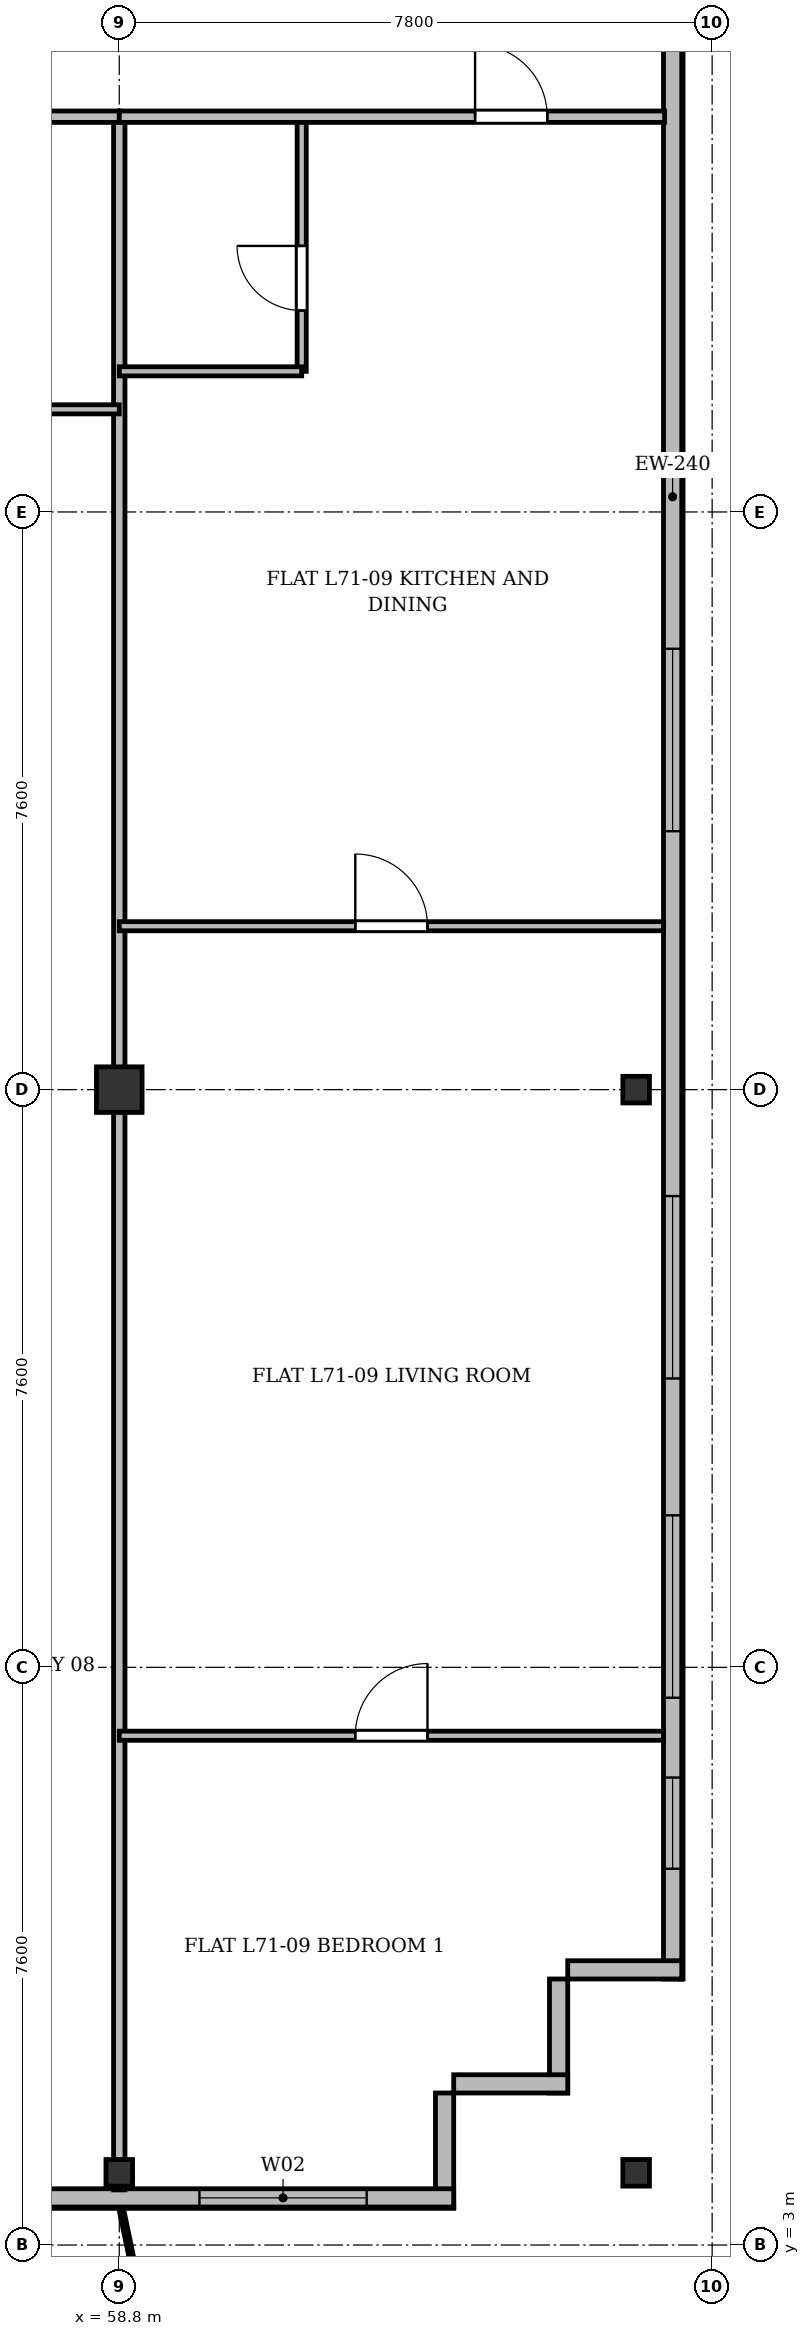
"""IFC4 building model, lengths in metres.
Left out: names, types, materials, properties, quantities, classifications, styles, units other than length and angle.
Written with IfcOpenShell. Run it as: python <this file> out.ifc"""

import sys

from ifc_helpers import new_model, si_unit, direction, frame, frame_2d, origin, origin_2d, place, context, subcontext, project, spatial, rectangle, i_section, extrude, source, transform, mapped, element, fill, save


model = new_model("IFC4")
c1 = context("Model", 3, precision=1e-05, world=origin(), true_north=direction((0.0, 1.0)))
c2 = subcontext(c1, "Body", "Model", "MODEL_VIEW")
j1 = project(units=[si_unit("LENGTHUNIT", "METRE"), si_unit("PLANEANGLEUNIT", "RADIAN")], contexts=[c1])
p1 = place(None, origin())
s1 = spatial("IfcSite", under=j1, at=p1, CompositionType="ELEMENT")
p2 = place(p1, origin())
s2 = spatial("IfcBuilding", under=s1, at=p2, CompositionType="ELEMENT")
p3 = place(p2, frame((0.0, 0.0, 273.9)))
s3 = spatial("IfcBuildingStorey", under=s2, at=p3, CompositionType="ELEMENT", Elevation=273.9)
m1 = source(origin(), c2, "Body", "SweptSolid", [
    extrude(i_section(OverallWidth=0.35, OverallDepth=0.35, WebThickness=0.018, FlangeThickness=0.028, at=origin_2d()), origin(), (0.0, 0.0, 1.0), 3.6),
])
p4 = place(p3, frame((58.8, 3.95, 0.0), z_axis=(0.0, 0.0, 1.0), x_axis=(1.0, 0.0, 0.0)))
e1 = element("IfcColumn", 1, at=p4, inside=s3, PredefinedType="COLUMN", context=c2, shape_type="MappedRepresentation", body=[
    mapped(m1, transform((0.0, 0.0, 0.0), x_axis=(1.0, 0.0, 0.0), y_axis=(0.0, 1.0, 0.0), z_axis=(0.0, 0.0, 1.0), scale=1.0)),
])
m2 = source(origin(), c2, "Body", "SweptSolid", [
    extrude(rectangle(XDim=0.6, YDim=0.6, at=origin_2d()), origin(), (0.0, 0.0, 1.0), 3.6),
])
p5 = place(p3, frame((58.8, 18.2, 0.0), z_axis=(0.0, 0.0, 1.0), x_axis=(1.0, 0.0, 0.0)))
e2 = element("IfcColumn", 2, at=p5, inside=s3, PredefinedType="COLUMN", context=c2, shape_type="MappedRepresentation", body=[
    mapped(m2, transform((0.0, 0.0, 0.0), x_axis=(1.0, 0.0, 0.0), y_axis=(0.0, 1.0, 0.0), z_axis=(0.0, 0.0, 1.0), scale=1.0)),
])
for number, where, z_axis, x_axis in (
    (3, (65.6, 3.95, 0.0), (0.0, 0.0, 1.0), (1.0, 0.0, 0.0)),
    (4, (65.6, 18.2, 0.0), (0.0, 0.0, 1.0), (1.0, 0.0, 0.0)),
):
    element("IfcColumn", number, at=place(p3, frame(where, z_axis=z_axis, x_axis=x_axis)), inside=s3, PredefinedType="COLUMN", context=c2, shape_type="MappedRepresentation", body=[
        mapped(m1, transform((0.0, 0.0, 0.0), x_axis=(1.0, 0.0, 0.0), y_axis=(0.0, 1.0, 0.0), z_axis=(0.0, 0.0, 1.0), scale=1.0)),
    ])
p6 = place(p3, frame((66.08, 45.5, 0.0), z_axis=(0.0, 0.0, 1.0), x_axis=(0.0, -1.0, 0.0)))
e5 = element("IfcWall", 5, at=p6, inside=s3, PredefinedType="SOLIDWALL", context=c2, shape_type="SweptSolid", body=[
    extrude(rectangle(XDim=39.0, YDim=0.24, at=frame_2d((19.5, 0.0))), origin(), (0.0, 0.0, 1.0), 3.37),
])
p7 = place(p6, frame((36.35, 0.0, 0.92)))
e6 = element("IfcOpeningElement", 6, at=p7, cuts=e5, PredefinedType="OPENING", context=c2, shape_type="SweptSolid", body=[
    extrude(rectangle(XDim=1.2, YDim=1.65, at=frame_2d((0.6, 0.825))), frame((0.0, 0.13, 0.0), z_axis=(0.0, -1.0, 0.0), x_axis=(1.0, 0.0, 0.0)), (0.0, 0.0, 1.0), 0.26),
])
p8 = place(p6, frame((32.9, 0.0, 0.92)))
e7 = element("IfcOpeningElement", 7, at=p8, cuts=e5, PredefinedType="OPENING", context=c2, shape_type="SweptSolid", body=[
    extrude(rectangle(XDim=2.4, YDim=2.1, at=frame_2d((1.2, 1.05))), frame((0.0, 0.13, 0.0), z_axis=(0.0, -1.0, 0.0), x_axis=(1.0, 0.0, 0.0)), (0.0, 0.0, 1.0), 0.26),
])
p9 = place(p6, frame((28.7, 0.0, 0.92)))
e8 = element("IfcOpeningElement", 8, at=p9, cuts=e5, PredefinedType="OPENING", context=c2, shape_type="SweptSolid", body=[
    extrude(rectangle(XDim=2.4, YDim=2.1, at=frame_2d((1.2, 1.05))), frame((0.0, 0.13, 0.0), z_axis=(0.0, -1.0, 0.0), x_axis=(1.0, 0.0, 0.0)), (0.0, 0.0, 1.0), 0.26),
])
p10 = place(p6, frame((21.5, 0.0, 0.92)))
e9 = element("IfcOpeningElement", 9, at=p10, cuts=e5, PredefinedType="OPENING", context=c2, shape_type="SweptSolid", body=[
    extrude(rectangle(XDim=2.4, YDim=2.1, at=frame_2d((1.2, 1.05))), frame((0.0, 0.13, 0.0), z_axis=(0.0, -1.0, 0.0), x_axis=(1.0, 0.0, 0.0)), (0.0, 0.0, 1.0), 0.26),
])
p11 = place(p6, frame((7.5, 0.0, 0.92)))
e10 = element("IfcOpeningElement", 10, at=p11, cuts=e5, PredefinedType="OPENING", context=c2, shape_type="SweptSolid", body=[
    extrude(rectangle(XDim=2.4, YDim=2.1, at=frame_2d((1.2, 1.05))), frame((0.0, 0.13, 0.0), z_axis=(0.0, -1.0, 0.0), x_axis=(1.0, 0.0, 0.0)), (0.0, 0.0, 1.0), 0.26),
])
p12 = place(p6, frame((4.5, 0.0, 0.92)))
e11 = element("IfcOpeningElement", 11, at=p12, cuts=e5, PredefinedType="OPENING", context=c2, shape_type="SweptSolid", body=[
    extrude(rectangle(XDim=1.2, YDim=1.65, at=frame_2d((0.6, 0.825))), frame((0.0, 0.13, 0.0), z_axis=(0.0, -1.0, 0.0), x_axis=(1.0, 0.0, 0.0)), (0.0, 0.0, 1.0), 0.26),
])
p13 = place(p6, frame((1.15, 0.0, 0.92)))
e12 = element("IfcOpeningElement", 12, at=p13, cuts=e5, PredefinedType="OPENING", context=c2, shape_type="SweptSolid", body=[
    extrude(rectangle(XDim=1.2, YDim=1.65, at=frame_2d((0.6, 0.825))), frame((0.0, 0.13, 0.0), z_axis=(0.0, -1.0, 0.0), x_axis=(1.0, 0.0, 0.0)), (0.0, 0.0, 1.0), 0.26),
])
p14 = place(p3, frame((66.2, 6.62, 0.0), z_axis=(0.0, 0.0, 1.0), x_axis=(-1.0, 0.0, 0.0)))
e13 = element("IfcWall", 13, at=p14, inside=s3, PredefinedType="SOLIDWALL", context=c2, shape_type="SweptSolid", body=[
    extrude(rectangle(XDim=1.5, YDim=0.24, at=frame_2d((0.75, 0.0))), origin(), (0.0, 0.0, 1.0), 2.87),
])
for number, where, z_axis, x_axis in (
    (14, (64.58, 6.5, 0.0), (0.0, 0.0, 1.0), (0.0, -1.0, 0.0)),
    (15, (64.7, 5.12, 0.0), (0.0, 0.0, 1.0), (-1.0, 0.0, 0.0)),
):
    element("IfcWall", number, at=place(p3, frame(where, z_axis=z_axis, x_axis=x_axis)), inside=s3, PredefinedType="SOLIDWALL", context=c2, shape_type="SweptSolid", body=[
        extrude(rectangle(XDim=1.5, YDim=0.24, at=frame_2d((0.75, 0.0))), origin(), (0.0, 0.0, 1.0), 3.37),
    ])
p15 = place(p3, frame((63.08, 5.0, 0.0), z_axis=(0.0, 0.0, 1.0), x_axis=(0.0, -1.0, 0.0)))
e16 = element("IfcWall", 16, at=p15, inside=s3, PredefinedType="SOLIDWALL", context=c2, shape_type="SweptSolid", body=[
    extrude(rectangle(XDim=1.5, YDim=0.24, at=frame_2d((0.75, 0.0))), origin(), (0.0, 0.0, 1.0), 2.92),
])
p16 = place(p3, frame((63.2, 3.62, 0.0), z_axis=(0.0, 0.0, 1.0), x_axis=(-1.0, 0.0, 0.0)))
e17 = element("IfcWall", 17, at=p16, inside=s3, PredefinedType="SOLIDWALL", context=c2, shape_type="SweptSolid", body=[
    extrude(rectangle(XDim=52.0, YDim=0.24, at=frame_2d((26.0, 0.0))), origin(), (0.0, 0.0, 1.0), 3.37),
])
p17 = place(p16, frame((1.145, 0.0, 0.9)))
e18 = element("IfcOpeningElement", 18, at=p17, cuts=e17, PredefinedType="OPENING", context=c2, shape_type="SweptSolid", body=[
    extrude(rectangle(XDim=2.2, YDim=1.8, at=frame_2d((1.1, 0.9))), frame((0.0, 0.13, 0.0), z_axis=(0.0, -1.0, 0.0), x_axis=(1.0, 0.0, 0.0)), (0.0, 0.0, 1.0), 0.26),
])
p18 = place(p16, frame((5.45, 0.0, 0.9)))
e19 = element("IfcOpeningElement", 19, at=p18, cuts=e17, PredefinedType="OPENING", context=c2, shape_type="SweptSolid", body=[
    extrude(rectangle(XDim=1.5, YDim=1.75, at=frame_2d((0.75, 0.875))), frame((0.0, 0.13, 0.0), z_axis=(0.0, -1.0, 0.0), x_axis=(1.0, 0.0, 0.0)), (0.0, 0.0, 1.0), 0.26),
])
p19 = place(p16, frame((9.1, 0.0, 0.9)))
e20 = element("IfcOpeningElement", 20, at=p19, cuts=e17, PredefinedType="OPENING", context=c2, shape_type="SweptSolid", body=[
    extrude(rectangle(XDim=2.0, YDim=1.95, at=frame_2d((1.0, 0.975))), frame((0.0, 0.13, 0.0), z_axis=(0.0, -1.0, 0.0), x_axis=(1.0, 0.0, 0.0)), (0.0, 0.0, 1.0), 0.26),
])
p20 = place(p16, frame((14.017, 0.0, 0.0)))
e21 = element("IfcOpeningElement", 21, at=p20, cuts=e17, PredefinedType="OPENING", context=c2, shape_type="SweptSolid", body=[
    extrude(rectangle(XDim=1.2, YDim=2.2, at=frame_2d((0.6, 1.1))), frame((0.0, 0.13, 0.0), z_axis=(0.0, -1.0, 0.0), x_axis=(1.0, 0.0, 0.0)), (0.0, 0.0, 1.0), 0.26),
])
p21 = place(p16, frame((25.1, 0.0, 0.9)))
e22 = element("IfcOpeningElement", 22, at=p21, cuts=e17, PredefinedType="OPENING", context=c2, shape_type="SweptSolid", body=[
    extrude(rectangle(XDim=1.8, YDim=1.8, at=frame_2d((0.9, 0.9))), frame((0.0, 0.13, 0.0), z_axis=(0.0, -1.0, 0.0), x_axis=(1.0, 0.0, 0.0)), (0.0, 0.0, 1.0), 0.26),
])
p22 = place(p16, frame((33.05, 0.0, 0.9)))
e23 = element("IfcOpeningElement", 23, at=p22, cuts=e17, PredefinedType="OPENING", context=c2, shape_type="SweptSolid", body=[
    extrude(rectangle(XDim=1.5, YDim=1.75, at=frame_2d((0.75, 0.875))), frame((0.0, 0.13, 0.0), z_axis=(0.0, -1.0, 0.0), x_axis=(1.0, 0.0, 0.0)), (0.0, 0.0, 1.0), 0.26),
])
p23 = place(p16, frame((35.45, 0.0, 0.9)))
e24 = element("IfcOpeningElement", 24, at=p23, cuts=e17, PredefinedType="OPENING", context=c2, shape_type="SweptSolid", body=[
    extrude(rectangle(XDim=1.5, YDim=1.75, at=frame_2d((0.75, 0.875))), frame((0.0, 0.13, 0.0), z_axis=(0.0, -1.0, 0.0), x_axis=(1.0, 0.0, 0.0)), (0.0, 0.0, 1.0), 0.26),
])
p24 = place(p16, frame((37.85, 0.0, 0.9)))
e25 = element("IfcOpeningElement", 25, at=p24, cuts=e17, PredefinedType="OPENING", context=c2, shape_type="SweptSolid", body=[
    extrude(rectangle(XDim=1.5, YDim=1.75, at=frame_2d((0.75, 0.875))), frame((0.0, 0.13, 0.0), z_axis=(0.0, -1.0, 0.0), x_axis=(1.0, 0.0, 0.0)), (0.0, 0.0, 1.0), 0.26),
])
p25 = place(p16, frame((41.452, 0.0, 0.0)))
e26 = element("IfcOpeningElement", 26, at=p25, cuts=e17, PredefinedType="OPENING", context=c2, shape_type="SweptSolid", body=[
    extrude(rectangle(XDim=1.2, YDim=2.2, at=frame_2d((0.6, 1.1))), frame((0.0, 0.13, 0.0), z_axis=(0.0, -1.0, 0.0), x_axis=(1.0, 0.0, 0.0)), (0.0, 0.0, 1.0), 0.26),
])
p26 = place(p16, frame((44.5, 0.0, 0.9)))
e27 = element("IfcOpeningElement", 27, at=p26, cuts=e17, PredefinedType="OPENING", context=c2, shape_type="SweptSolid", body=[
    extrude(rectangle(XDim=1.8, YDim=1.8, at=frame_2d((0.9, 0.9))), frame((0.0, 0.13, 0.0), z_axis=(0.0, -1.0, 0.0), x_axis=(1.0, 0.0, 0.0)), (0.0, 0.0, 1.0), 0.26),
])
p27 = place(p16, frame((48.655, 0.0, 0.9)))
e28 = element("IfcOpeningElement", 28, at=p27, cuts=e17, PredefinedType="OPENING", context=c2, shape_type="SweptSolid", body=[
    extrude(rectangle(XDim=2.2, YDim=1.8, at=frame_2d((1.1, 0.9))), frame((0.0, 0.13, 0.0), z_axis=(0.0, -1.0, 0.0), x_axis=(1.0, 0.0, 0.0)), (0.0, 0.0, 1.0), 0.26),
])
p28 = place(p3, frame((58.8, 3.725, 0.0), z_axis=(0.0, 0.0, 1.0), x_axis=(0.0, 1.0, 0.0)))
e29 = element("IfcWall", 29, at=p28, inside=s3, PredefinedType="PARTITIONING", context=c2, shape_type="SweptSolid", body=[
    extrude(rectangle(XDim=27.275, YDim=0.15, at=frame_2d((13.637, 0.0))), origin(), (0.0, 0.0, 1.0), 2.87),
])
p29 = place(p3, frame((55.2, 31.0, 0.0), z_axis=(0.0, 0.0, 1.0), x_axis=(1.0, 0.0, 0.0)))
e30 = element("IfcWall", 30, at=p29, inside=s3, PredefinedType="PARTITIONING", context=c2, shape_type="SweptSolid", body=[
    extrude(rectangle(XDim=3.6, YDim=0.15, at=frame_2d((1.8, 0.0))), origin(), (0.0, 0.0, 1.0), 2.87),
])
p30 = place(p29, frame((1.325, 0.0, 0.0)))
e31 = element("IfcOpeningElement", 31, at=p30, cuts=e30, PredefinedType="OPENING", context=c2, shape_type="SweptSolid", body=[
    extrude(rectangle(XDim=0.95, YDim=2.15, at=frame_2d((0.475, 1.075))), frame((0.0, 0.085, 0.0), z_axis=(0.0, -1.0, 0.0), x_axis=(1.0, 0.0, 0.0)), (0.0, 0.0, 1.0), 0.17),
])
p31 = place(p3, frame((55.2, 27.15, 0.0), z_axis=(0.0, 0.0, 1.0), x_axis=(1.0, 0.0, 0.0)))
e32 = element("IfcWall", 32, at=p31, inside=s3, PredefinedType="PARTITIONING", context=c2, shape_type="SweptSolid", body=[
    extrude(rectangle(XDim=3.6, YDim=0.12, at=frame_2d((1.8, 0.0))), origin(), (0.0, 0.0, 1.0), 2.87),
])
p32 = place(p31, frame((1.325, 0.0, 0.0)))
e33 = element("IfcOpeningElement", 33, at=p32, cuts=e32, PredefinedType="OPENING", context=c2, shape_type="SweptSolid", body=[
    extrude(rectangle(XDim=0.95, YDim=2.15, at=frame_2d((0.475, 1.075))), frame((0.0, 0.07, 0.0), z_axis=(0.0, -1.0, 0.0), x_axis=(1.0, 0.0, 0.0)), (0.0, 0.0, 1.0), 0.14),
])
p33 = place(p3, frame((58.8, 20.35, 0.0), z_axis=(0.0, 0.0, 1.0), x_axis=(1.0, 0.0, 0.0)))
e34 = element("IfcWall", 34, at=p33, inside=s3, PredefinedType="PARTITIONING", context=c2, shape_type="SweptSolid", body=[
    extrude(rectangle(XDim=7.16, YDim=0.12, at=frame_2d((3.58, 0.0))), origin(), (0.0, 0.0, 1.0), 2.87),
])
p34 = place(p33, frame((3.105, 0.0, 0.0)))
e35 = element("IfcOpeningElement", 35, at=p34, cuts=e34, PredefinedType="OPENING", context=c2, shape_type="SweptSolid", body=[
    extrude(rectangle(XDim=0.95, YDim=2.15, at=frame_2d((0.475, 1.075))), frame((0.0, 0.07, 0.0), z_axis=(0.0, -1.0, 0.0), x_axis=(1.0, 0.0, 0.0)), (0.0, 0.0, 1.0), 0.14),
])
p35 = place(p3, frame((61.2, 27.65, 0.0), z_axis=(0.0, 0.0, 1.0), x_axis=(0.0, 1.0, 0.0)))
e36 = element("IfcWall", 36, at=p35, inside=s3, PredefinedType="PARTITIONING", context=c2, shape_type="SweptSolid", body=[
    extrude(rectangle(XDim=3.35, YDim=0.12, at=frame_2d((1.675, 0.0))), origin(), (0.0, 0.0, 1.0), 3.37),
])
p36 = place(p35, frame((0.8, 0.0, 0.0)))
e37 = element("IfcOpeningElement", 37, at=p36, cuts=e36, PredefinedType="OPENING", context=c2, shape_type="SweptSolid", body=[
    extrude(rectangle(XDim=0.85, YDim=2.1, at=frame_2d((0.425, 1.05))), frame((0.0, 0.07, 0.0), z_axis=(0.0, -1.0, 0.0), x_axis=(1.0, 0.0, 0.0)), (0.0, 0.0, 1.0), 0.14),
])
p37 = place(p3, frame((58.8, 27.65, 0.0), z_axis=(0.0, 0.0, 1.0), x_axis=(1.0, 0.0, 0.0)))
e38 = element("IfcWall", 38, at=p37, inside=s3, PredefinedType="PARTITIONING", context=c2, shape_type="SweptSolid", body=[
    extrude(rectangle(XDim=2.4, YDim=0.12, at=frame_2d((1.2, 0.0))), origin(), (0.0, 0.0, 1.0), 2.87),
])
p38 = place(p3, frame((58.8, 31.0, 0.0), z_axis=(0.0, 0.0, 1.0), x_axis=(1.0, 0.0, 0.0)))
e39 = element("IfcWall", 39, at=p38, inside=s3, PredefinedType="PARTITIONING", context=c2, shape_type="SweptSolid", body=[
    extrude(rectangle(XDim=7.175, YDim=0.15, at=frame_2d((3.587, 0.0))), origin(), (0.0, 0.0, 1.0), 2.87),
])
p39 = place(p38, frame((4.681, 0.0, 0.0)))
e40 = element("IfcOpeningElement", 40, at=p39, cuts=e39, PredefinedType="OPENING", context=c2, shape_type="SweptSolid", body=[
    extrude(rectangle(XDim=0.95, YDim=2.15, at=frame_2d((0.475, 1.075))), frame((0.0, 0.085, 0.0), z_axis=(0.0, -1.0, 0.0), x_axis=(1.0, 0.0, 0.0)), (0.0, 0.0, 1.0), 0.17),
])
p40 = place(p3, frame((58.8, 9.7, 0.0), z_axis=(0.0, 0.0, 1.0), x_axis=(1.0, 0.0, 0.0)))
e41 = element("IfcWall", 41, at=p40, inside=s3, PredefinedType="PARTITIONING", context=c2, shape_type="SweptSolid", body=[
    extrude(rectangle(XDim=7.16, YDim=0.12, at=frame_2d((3.58, 0.0))), origin(), (0.0, 0.0, 1.0), 2.87),
])
p41 = place(p40, frame((3.105, 0.0, 0.0)))
e42 = element("IfcOpeningElement", 42, at=p41, cuts=e41, PredefinedType="OPENING", context=c2, shape_type="SweptSolid", body=[
    extrude(rectangle(XDim=0.95, YDim=2.15, at=frame_2d((0.475, 1.075))), frame((0.0, 0.07, 0.0), z_axis=(0.0, -1.0, 0.0), x_axis=(1.0, 0.0, 0.0)), (0.0, 0.0, 1.0), 0.14),
])
m3 = source(origin(), c2, "Body", "SweptSolid", [
    extrude(rectangle(XDim=1.2, YDim=1.65, at=frame_2d((0.6, 0.825))), frame((0.0, 0.03, 0.0), z_axis=(0.0, -1.0, 0.0), x_axis=(1.0, 0.0, 0.0)), (0.0, 0.0, 1.0), 0.06),
])
p42 = place(p7, origin())
e43 = element("IfcWindow", 43, at=p42, inside=s3, PartitioningType="SINGLE_PANEL", PredefinedType="WINDOW", context=c2, shape_type="MappedRepresentation", body=[
    mapped(m3, transform((0.0, 0.0, 0.0), x_axis=(1.0, 0.0, 0.0), y_axis=(0.0, 1.0, 0.0), z_axis=(0.0, 0.0, 1.0), scale=1.0)),
])
fill(e6, e43)
m4 = source(origin(), c2, "Body", "SweptSolid", [
    extrude(rectangle(XDim=2.4, YDim=2.1, at=frame_2d((1.2, 1.05))), frame((0.0, 0.03, 0.0), z_axis=(0.0, -1.0, 0.0), x_axis=(1.0, 0.0, 0.0)), (0.0, 0.0, 1.0), 0.06),
])
p43 = place(p8, origin())
e44 = element("IfcWindow", 44, at=p43, inside=s3, PartitioningType="SINGLE_PANEL", PredefinedType="WINDOW", context=c2, shape_type="MappedRepresentation", body=[
    mapped(m4, transform((0.0, 0.0, 0.0), x_axis=(1.0, 0.0, 0.0), y_axis=(0.0, 1.0, 0.0), z_axis=(0.0, 0.0, 1.0), scale=1.0)),
])
fill(e7, e44)
p44 = place(p9, origin())
e45 = element("IfcWindow", 45, at=p44, inside=s3, PartitioningType="SINGLE_PANEL", PredefinedType="WINDOW", context=c2, shape_type="MappedRepresentation", body=[
    mapped(m4, transform((0.0, 0.0, 0.0), x_axis=(1.0, 0.0, 0.0), y_axis=(0.0, 1.0, 0.0), z_axis=(0.0, 0.0, 1.0), scale=1.0)),
])
fill(e8, e45)
p45 = place(p10, origin())
e46 = element("IfcWindow", 46, at=p45, inside=s3, PartitioningType="SINGLE_PANEL", PredefinedType="WINDOW", context=c2, shape_type="MappedRepresentation", body=[
    mapped(m4, transform((0.0, 0.0, 0.0), x_axis=(1.0, 0.0, 0.0), y_axis=(0.0, 1.0, 0.0), z_axis=(0.0, 0.0, 1.0), scale=1.0)),
])
fill(e9, e46)
m5 = source(origin(), c2, "Body", "SweptSolid", [
    extrude(rectangle(XDim=2.2, YDim=1.8, at=frame_2d((1.1, 0.9))), frame((0.0, 0.03, 0.0), z_axis=(0.0, -1.0, 0.0), x_axis=(1.0, 0.0, 0.0)), (0.0, 0.0, 1.0), 0.06),
])
p46 = place(p17, origin())
e47 = element("IfcWindow", 47, at=p46, inside=s3, PartitioningType="SINGLE_PANEL", PredefinedType="WINDOW", context=c2, shape_type="MappedRepresentation", body=[
    mapped(m5, transform((0.0, 0.0, 0.0), x_axis=(1.0, 0.0, 0.0), y_axis=(0.0, 1.0, 0.0), z_axis=(0.0, 0.0, 1.0), scale=1.0)),
])
fill(e18, e47)
m6 = source(origin(), c2, "Body", "SweptSolid", [
    extrude(rectangle(XDim=0.95, YDim=2.15, at=frame_2d((0.475, 1.075))), frame((0.0, 0.025, 0.0), z_axis=(0.0, -1.0, 0.0), x_axis=(1.0, 0.0, 0.0)), (0.0, 0.0, 1.0), 0.05),
])
p47 = place(p34, origin())
e48 = element("IfcDoor", 48, at=p47, inside=s3, OperationType="SINGLE_SWING_LEFT", PredefinedType="DOOR", context=c2, shape_type="MappedRepresentation", body=[
    mapped(m6, transform((0.0, 0.0, 0.0), x_axis=(1.0, 0.0, 0.0), y_axis=(0.0, 1.0, 0.0), z_axis=(0.0, 0.0, 1.0), scale=1.0)),
])
fill(e35, e48)
m7 = source(origin(), c2, "Body", "SweptSolid", [
    extrude(rectangle(XDim=0.85, YDim=2.1, at=frame_2d((0.425, 1.05))), frame((0.0, 0.025, 0.0), z_axis=(0.0, -1.0, 0.0), x_axis=(1.0, 0.0, 0.0)), (0.0, 0.0, 1.0), 0.05),
])
p48 = place(p36, origin())
e49 = element("IfcDoor", 49, at=p48, inside=s3, OperationType="SINGLE_SWING_RIGHT", PredefinedType="DOOR", context=c2, shape_type="MappedRepresentation", body=[
    mapped(m7, transform((0.0, 0.0, 0.0), x_axis=(1.0, 0.0, 0.0), y_axis=(0.0, 1.0, 0.0), z_axis=(0.0, 0.0, 1.0), scale=1.0)),
])
fill(e37, e49)
p49 = place(p39, origin())
e50 = element("IfcDoor", 50, at=p49, inside=s3, OperationType="SINGLE_SWING_LEFT", PredefinedType="DOOR", context=c2, shape_type="MappedRepresentation", body=[
    mapped(m6, transform((0.0, 0.0, 0.0), x_axis=(1.0, 0.0, 0.0), y_axis=(0.0, 1.0, 0.0), z_axis=(0.0, 0.0, 1.0), scale=1.0)),
])
fill(e40, e50)
p50 = place(p41, origin())
e51 = element("IfcDoor", 51, at=p50, inside=s3, OperationType="SINGLE_SWING_RIGHT", PredefinedType="DOOR", context=c2, shape_type="MappedRepresentation", body=[
    mapped(m6, transform((0.0, 0.0, 0.0), x_axis=(1.0, 0.0, 0.0), y_axis=(0.0, 1.0, 0.0), z_axis=(0.0, 0.0, 1.0), scale=1.0)),
])
fill(e42, e51)
save(model, sys.argv[1])
